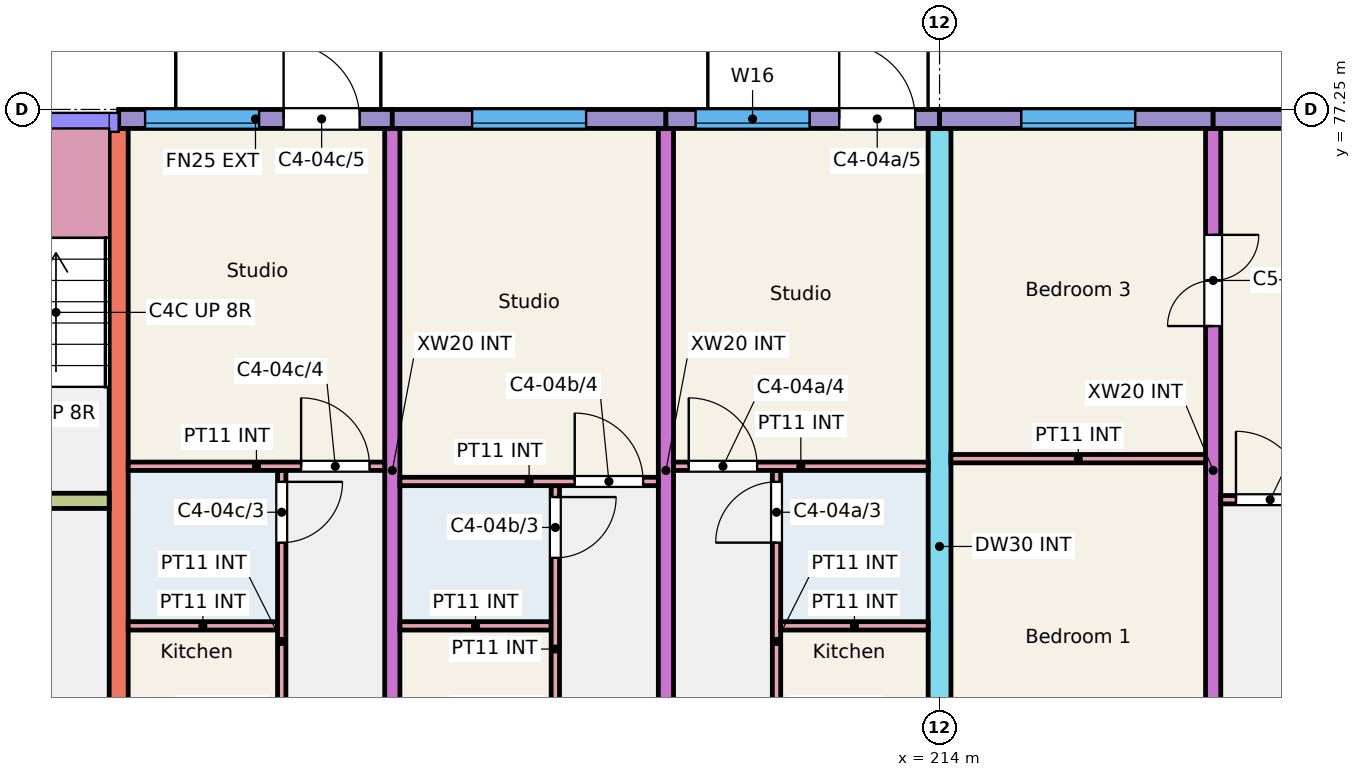
"""IFC4 building model, lengths in metres.
Left out: names, types, materials, properties, quantities, classifications, styles, units other than length and angle.
Written with IfcOpenShell. Run it as: python <this file> out.ifc"""

import sys

from ifc_helpers import new_model, si_unit, direction, frame, frame_2d, origin, place, context, subcontext, project, spatial, rectangle, extrude, element, fill, save


model = new_model("IFC4")
c1 = context("Model", 3, precision=1e-05, world=origin(), true_north=direction((0.0, 1.0)))
c2 = subcontext(c1, "Body", "Model", "MODEL_VIEW")
j1 = project(units=[si_unit("LENGTHUNIT", "METRE"), si_unit("PLANEANGLEUNIT", "RADIAN")], contexts=[c1])
p1 = place(None, origin())
s1 = spatial("IfcSite", under=j1, at=p1, CompositionType="ELEMENT")
p2 = place(p1, origin())
s2 = spatial("IfcBuilding", under=s1, at=p2, CompositionType="ELEMENT")
p3 = place(p2, frame((0.0, 0.0, 12.0)))
s3 = spatial("IfcBuildingStorey", under=s2, at=p3, CompositionType="ELEMENT", Elevation=12.0)
p4 = place(p3, frame((203.2, 68.0, 0.0), z_axis=(0.0, 0.0, 1.0), x_axis=(0.0, 1.0, 0.0)))
e1 = element("IfcWall", 1, at=p4, inside=s3, PredefinedType="SHEAR", context=c2, shape_type="SweptSolid", body=[
    extrude(rectangle(XDim=9.0, YDim=0.25, at=frame_2d((4.5, 0.0))), origin(), (0.0, 0.0, 1.0), 3.0),
])
for number, where, z_axis, x_axis in (
    (2, (206.8, 68.0, 0.0), (0.0, 0.0, 1.0), (0.0, 1.0, 0.0)),
    (3, (210.4, 68.0, 0.0), (0.0, 0.0, 1.0), (0.0, 1.0, 0.0)),
):
    element("IfcWall", number, at=place(p3, frame(where, z_axis=z_axis, x_axis=x_axis)), inside=s3, PredefinedType="SHEAR", context=c2, shape_type="SweptSolid", body=[
        extrude(rectangle(XDim=9.0, YDim=0.2, at=frame_2d((4.5, 0.0))), origin(), (0.0, 0.0, 1.0), 3.0),
    ])
p5 = place(p3, frame((214.0, 66.0, 0.0), z_axis=(0.0, 0.0, 1.0), x_axis=(0.0, 1.0, 0.0)))
e4 = element("IfcWall", 4, at=p5, inside=s3, PredefinedType="SHEAR", context=c2, shape_type="SweptSolid", body=[
    extrude(rectangle(XDim=11.0, YDim=0.3, at=frame_2d((5.5, 0.0))), origin(), (0.0, 0.0, 1.0), 3.0),
])
p6 = place(p5, frame((0.3, 0.0, 0.0)))
e5 = element("IfcOpeningElement", 5, at=p6, cuts=e4, PredefinedType="OPENING", context=c2, shape_type="SweptSolid", body=[
    extrude(rectangle(XDim=1.2, YDim=2.1, at=frame_2d((0.6, 1.05))), frame((0.0, 0.16, 0.0), z_axis=(0.0, -1.0, 0.0), x_axis=(1.0, 0.0, 0.0)), (0.0, 0.0, 1.0), 0.32),
])
p7 = place(p3, frame((217.6, 68.0, 0.0), z_axis=(0.0, 0.0, 1.0), x_axis=(0.0, 1.0, 0.0)))
e6 = element("IfcWall", 6, at=p7, inside=s3, PredefinedType="SHEAR", context=c2, shape_type="SweptSolid", body=[
    extrude(rectangle(XDim=9.0, YDim=0.2, at=frame_2d((4.5, 0.0))), origin(), (0.0, 0.0, 1.0), 3.0),
])
p8 = place(p7, frame((0.175, 0.0, 0.0)))
e7 = element("IfcOpeningElement", 7, at=p8, cuts=e6, PredefinedType="OPENING", context=c2, shape_type="SweptSolid", body=[
    extrude(rectangle(XDim=1.2, YDim=2.1, at=frame_2d((0.6, 1.05))), frame((0.0, 0.11, 0.0), z_axis=(0.0, -1.0, 0.0), x_axis=(1.0, 0.0, 0.0)), (0.0, 0.0, 1.0), 0.22),
])
p9 = place(p7, frame((6.4, 0.0, 0.0)))
e8 = element("IfcOpeningElement", 8, at=p9, cuts=e6, PredefinedType="OPENING", context=c2, shape_type="SweptSolid", body=[
    extrude(rectangle(XDim=1.2, YDim=2.1, at=frame_2d((0.6, 1.05))), frame((0.0, 0.11, 0.0), z_axis=(0.0, -1.0, 0.0), x_axis=(1.0, 0.0, 0.0)), (0.0, 0.0, 1.0), 0.22),
])
p10 = place(p3, frame((197.35, 72.1, 0.0), z_axis=(0.0, 0.0, 1.0), x_axis=(1.0, 0.0, 0.0)))
e9 = element("IfcWall", 9, at=p10, inside=s3, PredefinedType="SHEAR", context=c2, shape_type="SweptSolid", body=[
    extrude(rectangle(XDim=5.725, YDim=0.2, at=frame_2d((2.862, 0.0))), origin(), (0.0, 0.0, 1.0), 3.0),
])
p11 = place(p10, frame((3.775, 0.0, 0.0)))
e10 = element("IfcOpeningElement", 10, at=p11, cuts=e9, PredefinedType="OPENING", context=c2, shape_type="SweptSolid", body=[
    extrude(rectangle(XDim=1.0, YDim=2.1, at=frame_2d((0.5, 1.05))), frame((0.0, 0.11, 0.0), z_axis=(0.0, -1.0, 0.0), x_axis=(1.0, 0.0, 0.0)), (0.0, 0.0, 1.0), 0.22),
])
p12 = place(p10, frame((0.762, 0.0, 0.0)))
e11 = element("IfcOpeningElement", 11, at=p12, cuts=e9, PredefinedType="OPENING", context=c2, shape_type="SweptSolid", body=[
    extrude(rectangle(XDim=1.1, YDim=2.1, at=frame_2d((0.55, 1.05))), frame((0.0, 0.11, 0.0), z_axis=(0.0, -1.0, 0.0), x_axis=(1.0, 0.0, 0.0)), (0.0, 0.0, 1.0), 0.22),
])
p13 = place(p3, frame((203.2, 77.125, 0.0), z_axis=(0.0, 0.0, 1.0), x_axis=(1.0, 0.0, 0.0)))
e12 = element("IfcWall", 12, at=p13, inside=s3, PredefinedType="SOLIDWALL", context=c2, shape_type="SweptSolid", body=[
    extrude(rectangle(XDim=3.6, YDim=0.25, at=frame_2d((1.8, 0.0))), origin(), (0.0, 0.0, 1.0), 3.0),
])
p14 = place(p13, frame((0.347, 0.0, 0.9)))
e13 = element("IfcOpeningElement", 13, at=p14, cuts=e12, PredefinedType="OPENING", context=c2, shape_type="SweptSolid", body=[
    extrude(rectangle(XDim=1.5, YDim=1.5, at=frame_2d((0.75, 0.75))), frame((0.0, 0.135, 0.0), z_axis=(0.0, -1.0, 0.0), x_axis=(1.0, 0.0, 0.0)), (0.0, 0.0, 1.0), 0.27),
])
p15 = place(p13, frame((2.17, 0.0, 0.0)))
e14 = element("IfcOpeningElement", 14, at=p15, cuts=e12, PredefinedType="OPENING", context=c2, shape_type="SweptSolid", body=[
    extrude(rectangle(XDim=1.0, YDim=2.1, at=frame_2d((0.5, 1.05))), frame((0.0, 0.135, 0.0), z_axis=(0.0, -1.0, 0.0), x_axis=(1.0, 0.0, 0.0)), (0.0, 0.0, 1.0), 0.27),
])
p16 = place(p3, frame((206.8, 77.125, 0.0), z_axis=(0.0, 0.0, 1.0), x_axis=(1.0, 0.0, 0.0)))
e15 = element("IfcWall", 15, at=p16, inside=s3, PredefinedType="SOLIDWALL", context=c2, shape_type="SweptSolid", body=[
    extrude(rectangle(XDim=3.6, YDim=0.25, at=frame_2d((1.8, 0.0))), origin(), (0.0, 0.0, 1.0), 3.0),
])
p17 = place(p16, frame((1.05, 0.0, 0.9)))
e16 = element("IfcOpeningElement", 16, at=p17, cuts=e15, PredefinedType="OPENING", context=c2, shape_type="SweptSolid", body=[
    extrude(rectangle(XDim=1.5, YDim=1.5, at=frame_2d((0.75, 0.75))), frame((0.0, 0.135, 0.0), z_axis=(0.0, -1.0, 0.0), x_axis=(1.0, 0.0, 0.0)), (0.0, 0.0, 1.0), 0.27),
])
p18 = place(p3, frame((210.4, 77.125, 0.0), z_axis=(0.0, 0.0, 1.0), x_axis=(1.0, 0.0, 0.0)))
e17 = element("IfcWall", 17, at=p18, inside=s3, PredefinedType="SOLIDWALL", context=c2, shape_type="SweptSolid", body=[
    extrude(rectangle(XDim=3.6, YDim=0.25, at=frame_2d((1.8, 0.0))), origin(), (0.0, 0.0, 1.0), 3.0),
])
p19 = place(p18, frame((0.39, 0.0, 0.9)))
e18 = element("IfcOpeningElement", 18, at=p19, cuts=e17, PredefinedType="OPENING", context=c2, shape_type="SweptSolid", body=[
    extrude(rectangle(XDim=1.5, YDim=1.5, at=frame_2d((0.75, 0.75))), frame((0.0, 0.135, 0.0), z_axis=(0.0, -1.0, 0.0), x_axis=(1.0, 0.0, 0.0)), (0.0, 0.0, 1.0), 0.27),
])
p20 = place(p18, frame((2.28, 0.0, 0.0)))
e19 = element("IfcOpeningElement", 19, at=p20, cuts=e17, PredefinedType="OPENING", context=c2, shape_type="SweptSolid", body=[
    extrude(rectangle(XDim=1.0, YDim=2.1, at=frame_2d((0.5, 1.05))), frame((0.0, 0.135, 0.0), z_axis=(0.0, -1.0, 0.0), x_axis=(1.0, 0.0, 0.0)), (0.0, 0.0, 1.0), 0.27),
])
p21 = place(p3, frame((214.0, 77.125, 0.0), z_axis=(0.0, 0.0, 1.0), x_axis=(1.0, 0.0, 0.0)))
e20 = element("IfcWall", 20, at=p21, inside=s3, PredefinedType="SOLIDWALL", context=c2, shape_type="SweptSolid", body=[
    extrude(rectangle(XDim=3.6, YDim=0.25, at=frame_2d((1.8, 0.0))), origin(), (0.0, 0.0, 1.0), 3.0),
])
p22 = place(p21, frame((1.075, 0.0, 0.9)))
e21 = element("IfcOpeningElement", 21, at=p22, cuts=e20, PredefinedType="OPENING", context=c2, shape_type="SweptSolid", body=[
    extrude(rectangle(XDim=1.5, YDim=1.5, at=frame_2d((0.75, 0.75))), frame((0.0, 0.135, 0.0), z_axis=(0.0, -1.0, 0.0), x_axis=(1.0, 0.0, 0.0)), (0.0, 0.0, 1.0), 0.27),
])
p23 = place(p3, frame((217.6, 77.125, 0.0), z_axis=(0.0, 0.0, 1.0), x_axis=(1.0, 0.0, 0.0)))
e22 = element("IfcWall", 22, at=p23, inside=s3, PredefinedType="SOLIDWALL", context=c2, shape_type="SweptSolid", body=[
    extrude(rectangle(XDim=3.6, YDim=0.25, at=frame_2d((1.8, 0.0))), origin(), (0.0, 0.0, 1.0), 3.0),
])
p24 = place(p23, frame((1.05, 0.0, 0.9)))
e23 = element("IfcOpeningElement", 23, at=p24, cuts=e22, PredefinedType="OPENING", context=c2, shape_type="SweptSolid", body=[
    extrude(rectangle(XDim=1.5, YDim=1.5, at=frame_2d((0.75, 0.75))), frame((0.0, 0.135, 0.0), z_axis=(0.0, -1.0, 0.0), x_axis=(1.0, 0.0, 0.0)), (0.0, 0.0, 1.0), 0.27),
])
p25 = place(p3, frame((211.855, 68.0, 0.0), z_axis=(0.0, 0.0, 1.0), x_axis=(0.0, 1.0, 0.0)))
e24 = element("IfcWall", 24, at=p25, inside=s3, PredefinedType="PARTITIONING", context=c2, shape_type="SweptSolid", body=[
    extrude(rectangle(XDim=4.5, YDim=0.11, at=frame_2d((2.25, 0.0))), origin(), (0.0, 0.0, 1.0), 2.8),
])
p26 = place(p25, frame((0.2, 0.0, 0.0)))
e25 = element("IfcOpeningElement", 25, at=p26, cuts=e24, PredefinedType="OPENING", context=c2, shape_type="SweptSolid", body=[
    extrude(rectangle(XDim=0.8, YDim=2.1, at=frame_2d((0.4, 1.05))), frame((0.0, 0.065, 0.0), z_axis=(0.0, -1.0, 0.0), x_axis=(1.0, 0.0, 0.0)), (0.0, 0.0, 1.0), 0.13),
])
p27 = place(p25, frame((3.55, 0.0, 0.0)))
e26 = element("IfcOpeningElement", 26, at=p27, cuts=e24, PredefinedType="OPENING", context=c2, shape_type="SweptSolid", body=[
    extrude(rectangle(XDim=0.8, YDim=2.1, at=frame_2d((0.4, 1.05))), frame((0.0, 0.065, 0.0), z_axis=(0.0, -1.0, 0.0), x_axis=(1.0, 0.0, 0.0)), (0.0, 0.0, 1.0), 0.13),
])
p28 = place(p3, frame((211.91, 70.455, 0.0), z_axis=(0.0, 0.0, 1.0), x_axis=(1.0, 0.0, 0.0)))
e27 = element("IfcWall", 27, at=p28, inside=s3, PredefinedType="PARTITIONING", context=c2, shape_type="SweptSolid", body=[
    extrude(rectangle(XDim=1.94, YDim=0.11, at=frame_2d((0.97, 0.0))), origin(), (0.0, 0.0, 1.0), 2.8),
])
p29 = place(p3, frame((210.5, 72.555, 0.0), z_axis=(0.0, 0.0, 1.0), x_axis=(1.0, 0.0, 0.0)))
e28 = element("IfcWall", 28, at=p29, inside=s3, PredefinedType="PARTITIONING", context=c2, shape_type="SweptSolid", body=[
    extrude(rectangle(XDim=3.35, YDim=0.11, at=frame_2d((1.675, 0.0))), origin(), (0.0, 0.0, 1.0), 2.8),
])
p30 = place(p29, frame((0.2, 0.0, 0.0)))
e29 = element("IfcOpeningElement", 29, at=p30, cuts=e28, PredefinedType="OPENING", context=c2, shape_type="SweptSolid", body=[
    extrude(rectangle(XDim=0.9, YDim=2.1, at=frame_2d((0.45, 1.05))), frame((0.0, 0.065, 0.0), z_axis=(0.0, -1.0, 0.0), x_axis=(1.0, 0.0, 0.0)), (0.0, 0.0, 1.0), 0.13),
])
p31 = place(p3, frame((206.9, 70.455, 0.0), z_axis=(0.0, 0.0, 1.0), x_axis=(1.0, 0.0, 0.0)))
e30 = element("IfcWall", 30, at=p31, inside=s3, PredefinedType="PARTITIONING", context=c2, shape_type="SweptSolid", body=[
    extrude(rectangle(XDim=1.99, YDim=0.11, at=frame_2d((0.995, 0.0))), origin(), (0.0, 0.0, 1.0), 2.8),
])
p32 = place(p3, frame((208.945, 68.0, 0.0), z_axis=(0.0, 0.0, 1.0), x_axis=(0.0, 1.0, 0.0)))
e31 = element("IfcWall", 31, at=p32, inside=s3, PredefinedType="PARTITIONING", context=c2, shape_type="SweptSolid", body=[
    extrude(rectangle(XDim=4.3, YDim=0.11, at=frame_2d((2.15, 0.0))), origin(), (0.0, 0.0, 1.0), 2.8),
])
p33 = place(p32, frame((0.2, 0.0, 0.0)))
e32 = element("IfcOpeningElement", 32, at=p33, cuts=e31, PredefinedType="OPENING", context=c2, shape_type="SweptSolid", body=[
    extrude(rectangle(XDim=0.8, YDim=2.1, at=frame_2d((0.4, 1.05))), frame((0.0, 0.065, 0.0), z_axis=(0.0, -1.0, 0.0), x_axis=(1.0, 0.0, 0.0)), (0.0, 0.0, 1.0), 0.13),
])
p34 = place(p32, frame((3.35, 0.0, 0.0)))
e33 = element("IfcOpeningElement", 33, at=p34, cuts=e31, PredefinedType="OPENING", context=c2, shape_type="SweptSolid", body=[
    extrude(rectangle(XDim=0.8, YDim=2.1, at=frame_2d((0.4, 1.05))), frame((0.0, 0.065, 0.0), z_axis=(0.0, -1.0, 0.0), x_axis=(1.0, 0.0, 0.0)), (0.0, 0.0, 1.0), 0.13),
])
p35 = place(p3, frame((206.9, 72.355, 0.0), z_axis=(0.0, 0.0, 1.0), x_axis=(1.0, 0.0, 0.0)))
e34 = element("IfcWall", 34, at=p35, inside=s3, PredefinedType="PARTITIONING", context=c2, shape_type="SweptSolid", body=[
    extrude(rectangle(XDim=3.4, YDim=0.11, at=frame_2d((1.7, 0.0))), origin(), (0.0, 0.0, 1.0), 2.8),
])
p36 = place(p35, frame((2.3, 0.0, 0.0)))
e35 = element("IfcOpeningElement", 35, at=p36, cuts=e34, PredefinedType="OPENING", context=c2, shape_type="SweptSolid", body=[
    extrude(rectangle(XDim=0.9, YDim=2.1, at=frame_2d((0.45, 1.05))), frame((0.0, 0.065, 0.0), z_axis=(0.0, -1.0, 0.0), x_axis=(1.0, 0.0, 0.0)), (0.0, 0.0, 1.0), 0.13),
])
p37 = place(p3, frame((203.325, 70.455, 0.0), z_axis=(0.0, 0.0, 1.0), x_axis=(1.0, 0.0, 0.0)))
e36 = element("IfcWall", 36, at=p37, inside=s3, PredefinedType="PARTITIONING", context=c2, shape_type="SweptSolid", body=[
    extrude(rectangle(XDim=1.965, YDim=0.11, at=frame_2d((0.982, 0.0))), origin(), (0.0, 0.0, 1.0), 2.8),
])
p38 = place(p3, frame((205.345, 68.0, 0.0), z_axis=(0.0, 0.0, 1.0), x_axis=(0.0, 1.0, 0.0)))
e37 = element("IfcWall", 37, at=p38, inside=s3, PredefinedType="PARTITIONING", context=c2, shape_type="SweptSolid", body=[
    extrude(rectangle(XDim=4.5, YDim=0.11, at=frame_2d((2.25, 0.0))), origin(), (0.0, 0.0, 1.0), 2.8),
])
p39 = place(p38, frame((0.2, 0.0, 0.0)))
e38 = element("IfcOpeningElement", 38, at=p39, cuts=e37, PredefinedType="OPENING", context=c2, shape_type="SweptSolid", body=[
    extrude(rectangle(XDim=0.8, YDim=2.1, at=frame_2d((0.4, 1.05))), frame((0.0, 0.065, 0.0), z_axis=(0.0, -1.0, 0.0), x_axis=(1.0, 0.0, 0.0)), (0.0, 0.0, 1.0), 0.13),
])
p40 = place(p38, frame((3.55, 0.0, 0.0)))
e39 = element("IfcOpeningElement", 39, at=p40, cuts=e37, PredefinedType="OPENING", context=c2, shape_type="SweptSolid", body=[
    extrude(rectangle(XDim=0.8, YDim=2.1, at=frame_2d((0.4, 1.05))), frame((0.0, 0.065, 0.0), z_axis=(0.0, -1.0, 0.0), x_axis=(1.0, 0.0, 0.0)), (0.0, 0.0, 1.0), 0.13),
])
p41 = place(p3, frame((203.325, 72.555, 0.0), z_axis=(0.0, 0.0, 1.0), x_axis=(1.0, 0.0, 0.0)))
e40 = element("IfcWall", 40, at=p41, inside=s3, PredefinedType="PARTITIONING", context=c2, shape_type="SweptSolid", body=[
    extrude(rectangle(XDim=3.375, YDim=0.11, at=frame_2d((1.688, 0.0))), origin(), (0.0, 0.0, 1.0), 2.8),
])
p42 = place(p41, frame((2.275, 0.0, 0.0)))
e41 = element("IfcOpeningElement", 41, at=p42, cuts=e40, PredefinedType="OPENING", context=c2, shape_type="SweptSolid", body=[
    extrude(rectangle(XDim=0.9, YDim=2.1, at=frame_2d((0.45, 1.05))), frame((0.0, 0.065, 0.0), z_axis=(0.0, -1.0, 0.0), x_axis=(1.0, 0.0, 0.0)), (0.0, 0.0, 1.0), 0.13),
])
p43 = place(p3, frame((217.7, 72.115, 0.0), z_axis=(0.0, 0.0, 1.0), x_axis=(1.0, 0.0, 0.0)))
e42 = element("IfcWall", 42, at=p43, inside=s3, PredefinedType="PARTITIONING", context=c2, shape_type="SweptSolid", body=[
    extrude(rectangle(XDim=3.4, YDim=0.11, at=frame_2d((1.7, 0.0))), origin(), (0.0, 0.0, 1.0), 2.8),
])
p44 = place(p43, frame((0.2, 0.0, 0.0)))
e43 = element("IfcOpeningElement", 43, at=p44, cuts=e42, PredefinedType="OPENING", context=c2, shape_type="SweptSolid", body=[
    extrude(rectangle(XDim=0.9, YDim=2.1, at=frame_2d((0.45, 1.05))), frame((0.0, 0.065, 0.0), z_axis=(0.0, -1.0, 0.0), x_axis=(1.0, 0.0, 0.0)), (0.0, 0.0, 1.0), 0.13),
])
p45 = place(p3, frame((214.15, 72.655, 0.0), z_axis=(0.0, 0.0, 1.0), x_axis=(1.0, 0.0, 0.0)))
e44 = element("IfcWall", 44, at=p45, inside=s3, PredefinedType="PARTITIONING", context=c2, shape_type="SweptSolid", body=[
    extrude(rectangle(XDim=3.35, YDim=0.11, at=frame_2d((1.675, 0.0))), origin(), (0.0, 0.0, 1.0), 2.8),
])
p46 = place(p19, origin())
e45 = element("IfcWindow", 45, at=p46, inside=s3, PartitioningType="SINGLE_PANEL", PredefinedType="WINDOW", context=c2, shape_type="SweptSolid", body=[
    extrude(rectangle(XDim=1.5, YDim=1.5, at=frame_2d((0.75, 0.75))), frame((0.0, -0.025, 0.0), z_axis=(0.0, -1.0, 0.0), x_axis=(1.0, 0.0, 0.0)), (0.0, 0.0, 1.0), 0.06),
])
fill(e18, e45)
p47 = place(p17, origin())
e46 = element("IfcWindow", 46, at=p47, inside=s3, PartitioningType="SINGLE_PANEL", PredefinedType="WINDOW", context=c2, shape_type="SweptSolid", body=[
    extrude(rectangle(XDim=1.5, YDim=1.5, at=frame_2d((0.75, 0.75))), frame((0.0, -0.025, 0.0), z_axis=(0.0, -1.0, 0.0), x_axis=(1.0, 0.0, 0.0)), (0.0, 0.0, 1.0), 0.06),
])
fill(e16, e46)
p48 = place(p14, origin())
e47 = element("IfcWindow", 47, at=p48, inside=s3, PartitioningType="SINGLE_PANEL", PredefinedType="WINDOW", context=c2, shape_type="SweptSolid", body=[
    extrude(rectangle(XDim=1.5, YDim=1.5, at=frame_2d((0.75, 0.75))), frame((0.0, -0.025, 0.0), z_axis=(0.0, -1.0, 0.0), x_axis=(1.0, 0.0, 0.0)), (0.0, 0.0, 1.0), 0.06),
])
fill(e13, e47)
p49 = place(p22, origin())
e48 = element("IfcWindow", 48, at=p49, inside=s3, PartitioningType="SINGLE_PANEL", PredefinedType="WINDOW", context=c2, shape_type="SweptSolid", body=[
    extrude(rectangle(XDim=1.5, YDim=1.5, at=frame_2d((0.75, 0.75))), frame((0.0, -0.025, 0.0), z_axis=(0.0, -1.0, 0.0), x_axis=(1.0, 0.0, 0.0)), (0.0, 0.0, 1.0), 0.06),
])
fill(e21, e48)
p50 = place(p27, origin())
e49 = element("IfcDoor", 49, at=p50, inside=s3, OperationType="SINGLE_SWING_LEFT", PredefinedType="DOOR", context=c2, shape_type="SweptSolid", body=[
    extrude(rectangle(XDim=0.8, YDim=2.1, at=frame_2d((0.4, 1.05))), frame((0.0, 0.025, 0.0), z_axis=(0.0, -1.0, 0.0), x_axis=(1.0, 0.0, 0.0)), (0.0, 0.0, 1.0), 0.05),
])
fill(e26, e49)
p51 = place(p30, origin())
e50 = element("IfcDoor", 50, at=p51, inside=s3, OperationType="SINGLE_SWING_LEFT", PredefinedType="DOOR", context=c2, shape_type="SweptSolid", body=[
    extrude(rectangle(XDim=0.9, YDim=2.1, at=frame_2d((0.45, 1.05))), frame((0.0, 0.025, 0.0), z_axis=(0.0, -1.0, 0.0), x_axis=(1.0, 0.0, 0.0)), (0.0, 0.0, 1.0), 0.05),
])
fill(e29, e50)
p52 = place(p20, origin())
e51 = element("IfcDoor", 51, at=p52, inside=s3, OperationType="SINGLE_SWING_LEFT", PredefinedType="DOOR", context=c2, shape_type="SweptSolid", body=[
    extrude(rectangle(XDim=1.0, YDim=2.1, at=frame_2d((0.5, 1.05))), frame((0.0, 0.025, 0.0), z_axis=(0.0, -1.0, 0.0), x_axis=(1.0, 0.0, 0.0)), (0.0, 0.0, 1.0), 0.05),
])
fill(e19, e51)
p53 = place(p34, origin())
e52 = element("IfcDoor", 52, at=p53, inside=s3, OperationType="SINGLE_SWING_RIGHT", PredefinedType="DOOR", context=c2, shape_type="SweptSolid", body=[
    extrude(rectangle(XDim=0.8, YDim=2.1, at=frame_2d((0.4, 1.05))), frame((0.0, 0.025, 0.0), z_axis=(0.0, -1.0, 0.0), x_axis=(1.0, 0.0, 0.0)), (0.0, 0.0, 1.0), 0.05),
])
fill(e33, e52)
p54 = place(p36, origin())
e53 = element("IfcDoor", 53, at=p54, inside=s3, OperationType="SINGLE_SWING_LEFT", PredefinedType="DOOR", context=c2, shape_type="SweptSolid", body=[
    extrude(rectangle(XDim=0.9, YDim=2.1, at=frame_2d((0.45, 1.05))), frame((0.0, 0.025, 0.0), z_axis=(0.0, -1.0, 0.0), x_axis=(1.0, 0.0, 0.0)), (0.0, 0.0, 1.0), 0.05),
])
fill(e35, e53)
p55 = place(p40, origin())
e54 = element("IfcDoor", 54, at=p55, inside=s3, OperationType="SINGLE_SWING_RIGHT", PredefinedType="DOOR", context=c2, shape_type="SweptSolid", body=[
    extrude(rectangle(XDim=0.8, YDim=2.1, at=frame_2d((0.4, 1.05))), frame((0.0, 0.025, 0.0), z_axis=(0.0, -1.0, 0.0), x_axis=(1.0, 0.0, 0.0)), (0.0, 0.0, 1.0), 0.05),
])
fill(e39, e54)
p56 = place(p42, origin())
e55 = element("IfcDoor", 55, at=p56, inside=s3, OperationType="SINGLE_SWING_LEFT", PredefinedType="DOOR", context=c2, shape_type="SweptSolid", body=[
    extrude(rectangle(XDim=0.9, YDim=2.1, at=frame_2d((0.45, 1.05))), frame((0.0, 0.025, 0.0), z_axis=(0.0, -1.0, 0.0), x_axis=(1.0, 0.0, 0.0)), (0.0, 0.0, 1.0), 0.05),
])
fill(e41, e55)
p57 = place(p15, origin())
e56 = element("IfcDoor", 56, at=p57, inside=s3, OperationType="SINGLE_SWING_LEFT", PredefinedType="DOOR", context=c2, shape_type="SweptSolid", body=[
    extrude(rectangle(XDim=1.0, YDim=2.1, at=frame_2d((0.5, 1.05))), frame((0.0, 0.025, 0.0), z_axis=(0.0, -1.0, 0.0), x_axis=(1.0, 0.0, 0.0)), (0.0, 0.0, 1.0), 0.05),
])
fill(e14, e56)
p58 = place(p44, origin())
e57 = element("IfcDoor", 57, at=p58, inside=s3, OperationType="SINGLE_SWING_LEFT", PredefinedType="DOOR", context=c2, shape_type="SweptSolid", body=[
    extrude(rectangle(XDim=0.9, YDim=2.1, at=frame_2d((0.45, 1.05))), frame((0.0, 0.025, 0.0), z_axis=(0.0, -1.0, 0.0), x_axis=(1.0, 0.0, 0.0)), (0.0, 0.0, 1.0), 0.05),
])
fill(e43, e57)
p59 = place(p9, origin())
e58 = element("IfcDoor", 58, at=p59, inside=s3, OperationType="DOUBLE_DOOR_SINGLE_SWING", PredefinedType="DOOR", context=c2, shape_type="SweptSolid", body=[
    extrude(rectangle(XDim=1.2, YDim=2.1, at=frame_2d((0.6, 1.05))), frame((0.0, 0.025, 0.0), z_axis=(0.0, -1.0, 0.0), x_axis=(1.0, 0.0, 0.0)), (0.0, 0.0, 1.0), 0.05),
])
fill(e8, e58)
save(model, sys.argv[1])
